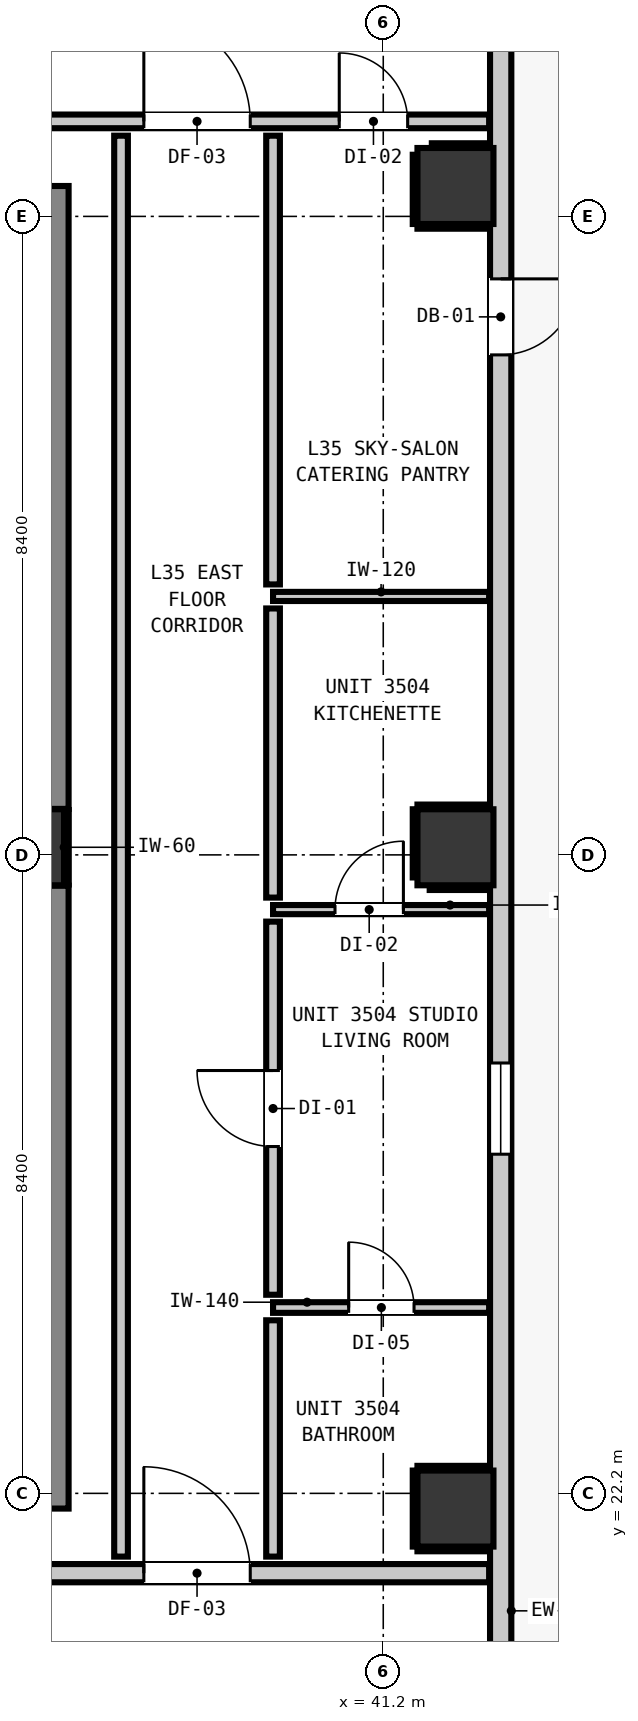
"""IFC4 building model, lengths in metres.
Left out: names, types, materials, properties, quantities, classifications, styles, units other than length and angle.
Written with IfcOpenShell. Run it as: python <this file> out.ifc"""

import sys

from ifc_helpers import new_model, si_unit, direction, frame, frame_2d, origin, origin_2d, place, context, subcontext, project, spatial, rectangle, extrude, element, fill, save


model = new_model("IFC4")
c1 = context("Model", 3, precision=1e-05, world=origin(), true_north=direction((0.0, 1.0)))
c2 = subcontext(c1, "Body", "Model", "MODEL_VIEW")
j1 = project(units=[si_unit("LENGTHUNIT", "METRE"), si_unit("PLANEANGLEUNIT", "RADIAN")], contexts=[c1])
p1 = place(None, origin())
s1 = spatial("IfcSite", under=j1, at=p1, CompositionType="ELEMENT")
p2 = place(p1, origin())
s2 = spatial("IfcBuilding", under=s1, at=p2, CompositionType="ELEMENT")
p3 = place(p2, frame((0.0, 0.0, 122.68)))
s3 = spatial("IfcBuildingStorey", under=s2, at=p3, CompositionType="ELEMENT", Elevation=122.68)
p4 = place(p3, frame((36.5, 30.7, 0.0), z_axis=(0.0, 0.0, 1.0), x_axis=(1.0, 0.0, 0.0)))
e1 = element("IfcColumn", 1, at=p4, inside=s3, PredefinedType="COLUMN", context=c2, shape_type="SweptSolid", body=[
    extrude(rectangle(XDim=1.0, YDim=1.0, at=origin_2d()), origin(), (0.0, 0.0, 1.0), 3.32),
])
p5 = place(p3, frame((36.56, 22.0, 0.0), z_axis=(0.0, 0.0, 1.0), x_axis=(0.0, 1.0, 0.0)))
e2 = element("IfcWall", 2, at=p5, inside=s3, PredefinedType="SHEAR", context=c2, shape_type="SweptSolid", body=[
    extrude(rectangle(XDim=8.195, YDim=1.0, at=frame_2d((4.098, 0.0))), origin(), (0.0, 0.0, 1.0), 3.32),
])
p6 = place(p3, frame((36.56, 31.205, 0.0), z_axis=(0.0, 0.0, 1.0), x_axis=(0.0, 1.0, 0.0)))
e3 = element("IfcWall", 3, at=p6, inside=s3, PredefinedType="SHEAR", context=c2, shape_type="SweptSolid", body=[
    extrude(rectangle(XDim=8.195, YDim=1.0, at=frame_2d((4.097, 0.0))), origin(), (0.0, 0.0, 1.0), 3.32),
])
for number, where, z_axis, x_axis in (
    (4, (42.15, 22.0, 0.0), (0.0, 0.0, 1.0), (1.0, 0.0, 0.0)),
    (5, (42.15, 30.7, 0.0), (0.0, 0.0, 1.0), (1.0, 0.0, 0.0)),
    (6, (42.15, 39.4, 0.0), (0.0, 0.0, 1.0), (1.0, 0.0, 0.0)),
):
    element("IfcColumn", number, at=place(p3, frame(where, z_axis=z_axis, x_axis=x_axis)), inside=s3, PredefinedType="COLUMN", context=c2, shape_type="SweptSolid", body=[
        extrude(rectangle(XDim=1.0, YDim=1.0, at=origin_2d()), origin(), (0.0, 0.0, 1.0), 2.9),
    ])
p7 = place(p3, frame((42.745, 43.645, 0.0), z_axis=(0.0, 0.0, 1.0), x_axis=(0.0, -1.0, 0.0)))
e7 = element("IfcWall", 7, at=p7, inside=s3, PredefinedType="STANDARD", context=c2, shape_type="SweptSolid", body=[
    extrude(rectangle(XDim=32.29, YDim=0.28, at=frame_2d((16.145, 0.0))), origin(), (0.0, 0.0, 1.0), 2.9),
])
p8 = place(p7, frame((5.467, 0.0, 0.0)))
e8 = element("IfcOpeningElement", 8, at=p8, cuts=e7, PredefinedType="OPENING", context=c2, shape_type="SweptSolid", body=[
    extrude(rectangle(XDim=1.0, YDim=2.15, at=frame_2d((0.5, 1.075))), frame((0.0, 0.15, 0.0), z_axis=(0.0, -1.0, 0.0), x_axis=(1.0, 0.0, 0.0)), (0.0, 0.0, 1.0), 0.3),
])
p9 = place(p7, frame((28.998, 0.0, 0.85)))
e9 = element("IfcOpeningElement", 9, at=p9, cuts=e7, PredefinedType="OPENING", context=c2, shape_type="SweptSolid", body=[
    extrude(rectangle(XDim=1.2, YDim=1.8, at=frame_2d((0.6, 0.9))), frame((0.0, 0.15, 0.0), z_axis=(0.0, -1.0, 0.0), x_axis=(1.0, 0.0, 0.0)), (0.0, 0.0, 1.0), 0.3),
])
p10 = place(p7, frame((0.318, 0.0, 0.85)))
e10 = element("IfcOpeningElement", 10, at=p10, cuts=e7, PredefinedType="OPENING", context=c2, shape_type="SweptSolid", body=[
    extrude(rectangle(XDim=1.05, YDim=1.65, at=frame_2d((0.525, 0.825))), frame((0.0, 0.15, 0.0), z_axis=(0.0, -1.0, 0.0), x_axis=(1.0, 0.0, 0.0)), (0.0, 0.0, 1.0), 0.3),
])
p11 = place(p7, frame((15.783, 0.0, 0.85)))
e11 = element("IfcOpeningElement", 11, at=p11, cuts=e7, PredefinedType="OPENING", context=c2, shape_type="SweptSolid", body=[
    extrude(rectangle(XDim=1.2, YDim=1.8, at=frame_2d((0.6, 0.9))), frame((0.0, 0.15, 0.0), z_axis=(0.0, -1.0, 0.0), x_axis=(1.0, 0.0, 0.0)), (0.0, 0.0, 1.0), 0.3),
])
p12 = place(p3, frame((3.207, 21.15, 0.0), z_axis=(0.0, 0.0, 1.0), x_axis=(1.0, 0.0, 0.0)))
e12 = element("IfcWall", 12, at=p12, inside=s3, PredefinedType="PARTITIONING", context=c2, shape_type="SweptSolid", body=[
    extrude(rectangle(XDim=39.386, YDim=0.24, at=frame_2d((19.693, 0.0))), origin(), (0.0, 0.0, 1.0), 2.9),
])
p13 = place(p12, frame((15.003, 0.0, 0.0)))
e13 = element("IfcOpeningElement", 13, at=p13, cuts=e12, PredefinedType="OPENING", context=c2, shape_type="SweptSolid", body=[
    extrude(rectangle(XDim=1.1, YDim=2.15, at=frame_2d((0.55, 1.075))), frame((0.0, 0.13, 0.0), z_axis=(0.0, -1.0, 0.0), x_axis=(1.0, 0.0, 0.0)), (0.0, 0.0, 1.0), 0.26),
])
p14 = place(p12, frame((7.243, 0.0, 0.0)))
e14 = element("IfcOpeningElement", 14, at=p14, cuts=e12, PredefinedType="OPENING", context=c2, shape_type="SweptSolid", body=[
    extrude(rectangle(XDim=1.4, YDim=2.15, at=frame_2d((0.7, 1.075))), frame((0.0, 0.13, 0.0), z_axis=(0.0, -1.0, 0.0), x_axis=(1.0, 0.0, 0.0)), (0.0, 0.0, 1.0), 0.26),
])
p15 = place(p12, frame((34.843, 0.0, 0.0)))
e15 = element("IfcOpeningElement", 15, at=p15, cuts=e12, PredefinedType="OPENING", context=c2, shape_type="SweptSolid", body=[
    extrude(rectangle(XDim=1.4, YDim=2.15, at=frame_2d((0.7, 1.075))), frame((0.0, 0.13, 0.0), z_axis=(0.0, -1.0, 0.0), x_axis=(1.0, 0.0, 0.0)), (0.0, 0.0, 1.0), 0.26),
])
p16 = place(p12, frame((3.042, 0.0, 0.0)))
e16 = element("IfcOpeningElement", 16, at=p16, cuts=e12, PredefinedType="OPENING", context=c2, shape_type="SweptSolid", body=[
    extrude(rectangle(XDim=0.9, YDim=2.1, at=frame_2d((0.45, 1.05))), frame((0.0, 0.13, 0.0), z_axis=(0.0, -1.0, 0.0), x_axis=(1.0, 0.0, 0.0)), (0.0, 0.0, 1.0), 0.26),
])
p17 = place(p3, frame((3.207, 40.25, 0.0), z_axis=(0.0, 0.0, 1.0), x_axis=(1.0, 0.0, 0.0)))
e17 = element("IfcWall", 17, at=p17, inside=s3, PredefinedType="PARTITIONING", context=c2, shape_type="SweptSolid", body=[
    extrude(rectangle(XDim=39.386, YDim=0.18, at=frame_2d((19.693, 0.0))), origin(), (0.0, 0.0, 1.0), 2.9),
])
p18 = place(p17, frame((14.228, 0.0, 0.0)))
e18 = element("IfcOpeningElement", 18, at=p18, cuts=e17, PredefinedType="OPENING", context=c2, shape_type="SweptSolid", body=[
    extrude(rectangle(XDim=1.4, YDim=2.15, at=frame_2d((0.7, 1.075))), frame((0.0, 0.1, 0.0), z_axis=(0.0, -1.0, 0.0), x_axis=(1.0, 0.0, 0.0)), (0.0, 0.0, 1.0), 0.2),
])
p19 = place(p17, frame((7.243, 0.0, 0.0)))
e19 = element("IfcOpeningElement", 19, at=p19, cuts=e17, PredefinedType="OPENING", context=c2, shape_type="SweptSolid", body=[
    extrude(rectangle(XDim=1.4, YDim=2.15, at=frame_2d((0.7, 1.075))), frame((0.0, 0.1, 0.0), z_axis=(0.0, -1.0, 0.0), x_axis=(1.0, 0.0, 0.0)), (0.0, 0.0, 1.0), 0.2),
])
p20 = place(p17, frame((34.843, 0.0, 0.0)))
e20 = element("IfcOpeningElement", 20, at=p20, cuts=e17, PredefinedType="OPENING", context=c2, shape_type="SweptSolid", body=[
    extrude(rectangle(XDim=1.4, YDim=2.15, at=frame_2d((0.7, 1.075))), frame((0.0, 0.1, 0.0), z_axis=(0.0, -1.0, 0.0), x_axis=(1.0, 0.0, 0.0)), (0.0, 0.0, 1.0), 0.2),
])
p21 = place(p17, frame((3.017, 0.0, 0.0)))
e21 = element("IfcOpeningElement", 21, at=p21, cuts=e17, PredefinedType="OPENING", context=c2, shape_type="SweptSolid", body=[
    extrude(rectangle(XDim=0.95, YDim=2.1, at=frame_2d((0.475, 1.05))), frame((0.0, 0.1, 0.0), z_axis=(0.0, -1.0, 0.0), x_axis=(1.0, 0.0, 0.0)), (0.0, 0.0, 1.0), 0.2),
])
p22 = place(p17, frame((37.414, 0.0, 0.0)))
e22 = element("IfcOpeningElement", 22, at=p22, cuts=e17, PredefinedType="OPENING", context=c2, shape_type="SweptSolid", body=[
    extrude(rectangle(XDim=0.9, YDim=2.1, at=frame_2d((0.45, 1.05))), frame((0.0, 0.1, 0.0), z_axis=(0.0, -1.0, 0.0), x_axis=(1.0, 0.0, 0.0)), (0.0, 0.0, 1.0), 0.2),
])
p23 = place(p3, frame((39.75, 24.645, 0.0), z_axis=(0.0, 0.0, 1.0), x_axis=(1.0, 0.0, 0.0)))
e23 = element("IfcWall", 23, at=p23, inside=s3, PredefinedType="PARTITIONING", context=c2, shape_type="SweptSolid", body=[
    extrude(rectangle(XDim=2.843, YDim=0.14, at=frame_2d((1.421, 0.0))), origin(), (0.0, 0.0, 1.0), 2.9),
])
p24 = place(p23, frame((0.995, 0.0, 0.0)))
e24 = element("IfcOpeningElement", 24, at=p24, cuts=e23, PredefinedType="OPENING", context=c2, shape_type="SweptSolid", body=[
    extrude(rectangle(XDim=0.86, YDim=2.02, at=frame_2d((0.43, 1.01))), frame((0.0, 0.08, 0.0), z_axis=(0.0, -1.0, 0.0), x_axis=(1.0, 0.0, 0.0)), (0.0, 0.0, 1.0), 0.16),
])
p25 = place(p3, frame((39.75, 29.88, 0.0), z_axis=(0.0, 0.0, 1.0), x_axis=(1.0, 0.0, 0.0)))
e25 = element("IfcWall", 25, at=p25, inside=s3, PredefinedType="PARTITIONING", context=c2, shape_type="SweptSolid", body=[
    extrude(rectangle(XDim=2.843, YDim=0.12, at=frame_2d((1.421, 0.0))), origin(), (0.0, 0.0, 1.0), 2.9),
])
p26 = place(p25, frame((0.815, 0.0, 0.0)))
e26 = element("IfcOpeningElement", 26, at=p26, cuts=e25, PredefinedType="OPENING", context=c2, shape_type="SweptSolid", body=[
    extrude(rectangle(XDim=0.9, YDim=2.1, at=frame_2d((0.45, 1.05))), frame((0.0, 0.07, 0.0), z_axis=(0.0, -1.0, 0.0), x_axis=(1.0, 0.0, 0.0)), (0.0, 0.0, 1.0), 0.14),
])
p27 = place(p3, frame((39.75, 34.0, 0.0), z_axis=(0.0, 0.0, 1.0), x_axis=(1.0, 0.0, 0.0)))
e27 = element("IfcWall", 27, at=p27, inside=s3, PredefinedType="PARTITIONING", context=c2, shape_type="SweptSolid", body=[
    extrude(rectangle(XDim=2.843, YDim=0.12, at=frame_2d((1.421, 0.0))), origin(), (0.0, 0.0, 1.0), 2.9),
])
p28 = place(p3, frame((37.75, 21.368, 0.0), z_axis=(0.0, 0.0, 1.0), x_axis=(0.0, 1.0, 0.0)))
e28 = element("IfcWall", 28, at=p28, inside=s3, PredefinedType="PARTITIONING", context=c2, shape_type="SweptSolid", body=[
    extrude(rectangle(XDim=18.694, YDim=0.18, at=frame_2d((9.347, 0.0))), origin(), (0.0, 0.0, 1.0), 2.9),
])
p29 = place(p3, frame((39.75, 21.368, 0.0), z_axis=(0.0, 0.0, 1.0), x_axis=(0.0, 1.0, 0.0)))
e29 = element("IfcWall", 29, at=p29, inside=s3, PredefinedType="PARTITIONING", context=c2, shape_type="SweptSolid", body=[
    extrude(rectangle(XDim=3.109, YDim=0.18, at=frame_2d((1.555, 0.0))), origin(), (0.0, 0.0, 1.0), 2.9),
])
p30 = place(p3, frame((39.75, 24.813, 0.0), z_axis=(0.0, 0.0, 1.0), x_axis=(0.0, 1.0, 0.0)))
e30 = element("IfcWall", 30, at=p30, inside=s3, PredefinedType="PARTITIONING", context=c2, shape_type="SweptSolid", body=[
    extrude(rectangle(XDim=4.909, YDim=0.18, at=frame_2d((2.455, 0.0))), origin(), (0.0, 0.0, 1.0), 2.9),
])
p31 = place(p30, frame((1.95, 0.0, 0.0)))
e31 = element("IfcOpeningElement", 31, at=p31, cuts=e30, PredefinedType="OPENING", context=c2, shape_type="SweptSolid", body=[
    extrude(rectangle(XDim=1.0, YDim=2.15, at=frame_2d((0.5, 1.075))), frame((0.0, 0.1, 0.0), z_axis=(0.0, -1.0, 0.0), x_axis=(1.0, 0.0, 0.0)), (0.0, 0.0, 1.0), 0.2),
])
p32 = place(p3, frame((39.75, 30.038, 0.0), z_axis=(0.0, 0.0, 1.0), x_axis=(0.0, 1.0, 0.0)))
e32 = element("IfcWall", 32, at=p32, inside=s3, PredefinedType="PARTITIONING", context=c2, shape_type="SweptSolid", body=[
    extrude(rectangle(XDim=3.804, YDim=0.18, at=frame_2d((1.902, 0.0))), origin(), (0.0, 0.0, 1.0), 2.9),
])
p33 = place(p3, frame((39.75, 34.158, 0.0), z_axis=(0.0, 0.0, 1.0), x_axis=(0.0, 1.0, 0.0)))
e33 = element("IfcWall", 33, at=p33, inside=s3, PredefinedType="PARTITIONING", context=c2, shape_type="SweptSolid", body=[
    extrude(rectangle(XDim=5.904, YDim=0.18, at=frame_2d((2.952, 0.0))), origin(), (0.0, 0.0, 1.0), 2.9),
])
p34 = place(p3, frame((37.032, 30.21, 0.0), z_axis=(0.0, 0.0, 1.0), x_axis=(0.0, 1.0, 0.0)))
e34 = element("IfcWall", 34, at=p34, inside=s3, PredefinedType="PARTITIONING", context=c2, shape_type="SweptSolid", body=[
    extrude(rectangle(XDim=0.98, YDim=0.06, at=frame_2d((0.49, 0.0))), origin(), (0.0, 0.0, 1.0), 0.905),
])
for number, where, z_axis, x_axis in (
    (35, (41.65, 21.468, 0.0), (0.0, 0.0, 1.0), (1.0, 0.0, 0.0)),
    (36, (41.65, 22.532, 0.0), (0.0, 0.0, 1.0), (1.0, 0.0, 0.0)),
):
    element("IfcWall", number, at=place(p3, frame(where, z_axis=z_axis, x_axis=x_axis)), inside=s3, PredefinedType="PARTITIONING", context=c2, shape_type="SweptSolid", body=[
        extrude(rectangle(XDim=0.94, YDim=0.06, at=frame_2d((0.47, 0.0))), origin(), (0.0, 0.0, 1.0), 0.905),
    ])
p35 = place(p3, frame((41.618, 21.5, 0.0), z_axis=(0.0, 0.0, 1.0), x_axis=(0.0, 1.0, 0.0)))
e37 = element("IfcWall", 37, at=p35, inside=s3, PredefinedType="PARTITIONING", context=c2, shape_type="SweptSolid", body=[
    extrude(rectangle(XDim=1.0, YDim=0.06, at=frame_2d((0.5, 0.0))), origin(), (0.0, 0.0, 1.0), 1.45),
])
p36 = place(p3, frame((41.811, 30.168, 0.0), z_axis=(0.0, 0.0, 1.0), x_axis=(1.0, 0.0, 0.0)))
e38 = element("IfcWall", 38, at=p36, inside=s3, PredefinedType="PARTITIONING", context=c2, shape_type="SweptSolid", body=[
    extrude(rectangle(XDim=0.779, YDim=0.06, at=frame_2d((0.39, 0.0))), origin(), (0.0, 0.0, 1.0), 0.905),
])
p37 = place(p3, frame((41.65, 31.232, 0.0), z_axis=(0.0, 0.0, 1.0), x_axis=(1.0, 0.0, 0.0)))
e39 = element("IfcWall", 39, at=p37, inside=s3, PredefinedType="PARTITIONING", context=c2, shape_type="SweptSolid", body=[
    extrude(rectangle(XDim=0.94, YDim=0.06, at=frame_2d((0.47, 0.0))), origin(), (0.0, 0.0, 1.0), 0.905),
])
p38 = place(p3, frame((41.618, 30.303, 0.0), z_axis=(0.0, 0.0, 1.0), x_axis=(0.0, 1.0, 0.0)))
e40 = element("IfcWall", 40, at=p38, inside=s3, PredefinedType="PARTITIONING", context=c2, shape_type="SweptSolid", body=[
    extrude(rectangle(XDim=0.897, YDim=0.06, at=frame_2d((0.448, 0.0))), origin(), (0.0, 0.0, 1.0), 1.45),
])
p39 = place(p3, frame((41.65, 38.868, 0.0), z_axis=(0.0, 0.0, 1.0), x_axis=(1.0, 0.0, 0.0)))
e41 = element("IfcWall", 41, at=p39, inside=s3, PredefinedType="PARTITIONING", context=c2, shape_type="SweptSolid", body=[
    extrude(rectangle(XDim=0.94, YDim=0.06, at=frame_2d((0.47, 0.0))), origin(), (0.0, 0.0, 1.0), 0.905),
])
p40 = place(p3, frame((41.839, 39.932, 0.0), z_axis=(0.0, 0.0, 1.0), x_axis=(1.0, 0.0, 0.0)))
e42 = element("IfcWall", 42, at=p40, inside=s3, PredefinedType="PARTITIONING", context=c2, shape_type="SweptSolid", body=[
    extrude(rectangle(XDim=0.751, YDim=0.06, at=frame_2d((0.375, 0.0))), origin(), (0.0, 0.0, 1.0), 0.905),
])
p41 = place(p3, frame((41.618, 38.9, 0.0), z_axis=(0.0, 0.0, 1.0), x_axis=(0.0, 1.0, 0.0)))
e43 = element("IfcWall", 43, at=p41, inside=s3, PredefinedType="PARTITIONING", context=c2, shape_type="SweptSolid", body=[
    extrude(rectangle(XDim=0.911, YDim=0.06, at=frame_2d((0.456, 0.0))), origin(), (0.0, 0.0, 1.0), 1.45),
])
p42 = place(p8, origin())
e44 = element("IfcDoor", 44, at=p42, inside=s3, OperationType="SINGLE_SWING_LEFT", PredefinedType="DOOR", context=c2, shape_type="SweptSolid", body=[
    extrude(rectangle(XDim=1.0, YDim=2.15, at=frame_2d((0.5, 1.075))), frame((0.0, 0.025, 0.0), z_axis=(0.0, -1.0, 0.0), x_axis=(1.0, 0.0, 0.0)), (0.0, 0.0, 1.0), 0.05),
])
fill(e8, e44)
p43 = place(p11, origin())
e45 = element("IfcWindow", 45, at=p43, inside=s3, PartitioningType="SINGLE_PANEL", PredefinedType="WINDOW", context=c2, shape_type="SweptSolid", body=[
    extrude(rectangle(XDim=1.2, YDim=1.8, at=frame_2d((0.6, 0.9))), frame((0.0, 0.03, 0.0), z_axis=(0.0, -1.0, 0.0), x_axis=(1.0, 0.0, 0.0)), (0.0, 0.0, 1.0), 0.06),
])
fill(e11, e45)
p44 = place(p15, origin())
e46 = element("IfcDoor", 46, at=p44, inside=s3, OperationType="SINGLE_SWING_LEFT", PredefinedType="DOOR", context=c2, shape_type="SweptSolid", body=[
    extrude(rectangle(XDim=1.4, YDim=2.15, at=frame_2d((0.7, 1.075))), frame((0.0, 0.025, 0.0), z_axis=(0.0, -1.0, 0.0), x_axis=(1.0, 0.0, 0.0)), (0.0, 0.0, 1.0), 0.05),
])
fill(e15, e46)
p45 = place(p20, origin())
e47 = element("IfcDoor", 47, at=p45, inside=s3, OperationType="SINGLE_SWING_LEFT", PredefinedType="DOOR", context=c2, shape_type="SweptSolid", body=[
    extrude(rectangle(XDim=1.4, YDim=2.15, at=frame_2d((0.7, 1.075))), frame((0.0, 0.025, 0.0), z_axis=(0.0, -1.0, 0.0), x_axis=(1.0, 0.0, 0.0)), (0.0, 0.0, 1.0), 0.05),
])
fill(e20, e47)
p46 = place(p31, origin())
e48 = element("IfcDoor", 48, at=p46, inside=s3, OperationType="SINGLE_SWING_RIGHT", PredefinedType="DOOR", context=c2, shape_type="SweptSolid", body=[
    extrude(rectangle(XDim=1.0, YDim=2.15, at=frame_2d((0.5, 1.075))), frame((0.0, 0.025, 0.0), z_axis=(0.0, -1.0, 0.0), x_axis=(1.0, 0.0, 0.0)), (0.0, 0.0, 1.0), 0.05),
])
fill(e31, e48)
p47 = place(p24, origin())
e49 = element("IfcDoor", 49, at=p47, inside=s3, OperationType="SINGLE_SWING_LEFT", PredefinedType="DOOR", context=c2, shape_type="SweptSolid", body=[
    extrude(rectangle(XDim=0.86, YDim=2.02, at=frame_2d((0.43, 1.01))), frame((0.0, 0.025, 0.0), z_axis=(0.0, -1.0, 0.0), x_axis=(1.0, 0.0, 0.0)), (0.0, 0.0, 1.0), 0.05),
])
fill(e24, e49)
p48 = place(p26, origin())
e50 = element("IfcDoor", 50, at=p48, inside=s3, OperationType="SINGLE_SWING_RIGHT", PredefinedType="DOOR", context=c2, shape_type="SweptSolid", body=[
    extrude(rectangle(XDim=0.9, YDim=2.1, at=frame_2d((0.45, 1.05))), frame((0.0, 0.025, 0.0), z_axis=(0.0, -1.0, 0.0), x_axis=(1.0, 0.0, 0.0)), (0.0, 0.0, 1.0), 0.05),
])
fill(e26, e50)
p49 = place(p22, origin())
e51 = element("IfcDoor", 51, at=p49, inside=s3, OperationType="SINGLE_SWING_LEFT", PredefinedType="DOOR", context=c2, shape_type="SweptSolid", body=[
    extrude(rectangle(XDim=0.9, YDim=2.1, at=frame_2d((0.45, 1.05))), frame((0.0, 0.025, 0.0), z_axis=(0.0, -1.0, 0.0), x_axis=(1.0, 0.0, 0.0)), (0.0, 0.0, 1.0), 0.05),
])
fill(e22, e51)
save(model, sys.argv[1])
